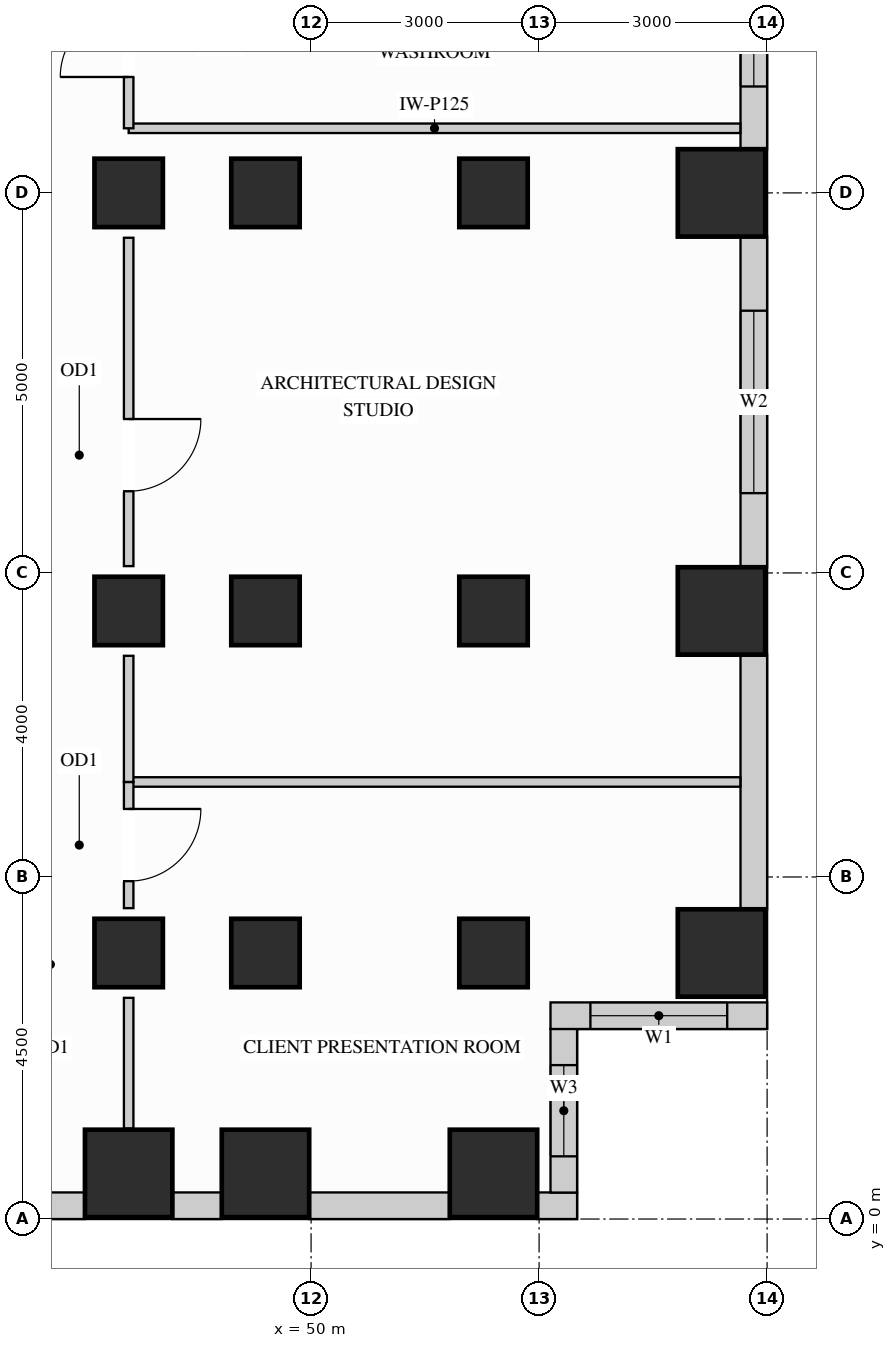
"""IFC4 building model, lengths in metres.
Left out: names, types, materials, properties, quantities, classifications, styles, units other than length and angle.
Written with IfcOpenShell. Run it as: python <this file> out.ifc"""

import sys

from ifc_helpers import new_model, si_unit, direction, frame, frame_2d, origin, origin_2d, place, context, subcontext, project, spatial, rectangle, extrude, source, transform, mapped, element, fill, save


model = new_model("IFC4")
c1 = context("Model", 3, precision=1e-05, world=origin(), true_north=direction((0.0, 1.0)))
c2 = subcontext(c1, "Body", "Model", "MODEL_VIEW")
j1 = project(units=[si_unit("LENGTHUNIT", "METRE"), si_unit("PLANEANGLEUNIT", "RADIAN")], contexts=[c1])
p1 = place(None, origin())
s1 = spatial("IfcSite", under=j1, at=p1, CompositionType="ELEMENT")
p2 = place(p1, origin())
s2 = spatial("IfcBuilding", under=s1, at=p2, CompositionType="ELEMENT")
p3 = place(p2, frame((0.0, 0.0, 109.8)))
s3 = spatial("IfcBuildingStorey", under=s2, at=p3, CompositionType="ELEMENT", Elevation=109.8)
m1 = source(origin(), c2, "Body", "SweptSolid", [
    extrude(rectangle(XDim=0.9, YDim=0.9, at=origin_2d()), origin(), (0.0, 0.0, 1.0), 3.38),
])
for number, where, z_axis, x_axis in (
    (1, (47.6, 13.5, 0.0), (0.0, 0.0, 1.0), (1.0, 0.0, 0.0)),
    (2, (47.6, 3.5, 0.0), (0.0, 0.0, 1.0), (1.0, 0.0, 0.0)),
    (3, (47.6, 8.0, 0.0), (0.0, 0.0, 1.0), (1.0, 0.0, 0.0)),
    (4, (49.4, 13.5, 0.0), (0.0, 0.0, 1.0), (1.0, 0.0, 0.0)),
    (5, (49.4, 3.5, 0.0), (0.0, 0.0, 1.0), (1.0, 0.0, 0.0)),
    (6, (49.4, 8.0, 0.0), (0.0, 0.0, 1.0), (1.0, 0.0, 0.0)),
    (7, (52.4, 13.5, 0.0), (0.0, 0.0, 1.0), (1.0, 0.0, 0.0)),
    (8, (52.4, 3.5, 0.0), (0.0, 0.0, 1.0), (1.0, 0.0, 0.0)),
    (9, (52.4, 8.0, 0.0), (0.0, 0.0, 1.0), (1.0, 0.0, 0.0)),
):
    element("IfcColumn", number, at=place(p3, frame(where, z_axis=z_axis, x_axis=x_axis)), inside=s3, PredefinedType="COLUMN", context=c2, shape_type="MappedRepresentation", body=[
        mapped(m1, transform((0.0, 0.0, 0.0), x_axis=(1.0, 0.0, 0.0), y_axis=(0.0, 1.0, 0.0), z_axis=(0.0, 0.0, 1.0))),
    ])
m2 = source(origin(), c2, "Body", "SweptSolid", [
    extrude(rectangle(XDim=1.15, YDim=1.15, at=origin_2d()), origin(), (0.0, 0.0, 1.0), 3.38),
])
for number, where, z_axis, x_axis in (
    (10, (55.4, 13.5, 0.0), (0.0, 0.0, 1.0), (1.0, 0.0, 0.0)),
    (11, (55.4, 3.5, 0.0), (0.0, 0.0, 1.0), (1.0, 0.0, 0.0)),
    (12, (55.4, 8.0, 0.0), (0.0, 0.0, 1.0), (1.0, 0.0, 0.0)),
    (13, (47.6, 0.6, 0.0), (0.0, 0.0, 1.0), (1.0, 0.0, 0.0)),
    (14, (49.4, 0.6, 0.0), (0.0, 0.0, 1.0), (1.0, 0.0, 0.0)),
    (15, (52.4, 0.6, 0.0), (0.0, 0.0, 1.0), (1.0, 0.0, 0.0)),
):
    element("IfcColumn", number, at=place(p3, frame(where, z_axis=z_axis, x_axis=x_axis)), inside=s3, PredefinedType="COLUMN", context=c2, shape_type="MappedRepresentation", body=[
        mapped(m2, transform((0.0, 0.0, 0.0), x_axis=(1.0, 0.0, 0.0), y_axis=(0.0, 1.0, 0.0), z_axis=(0.0, 0.0, 1.0))),
    ])
p4 = place(p3, frame((40.573, 0.175, 0.0), z_axis=(0.0, 0.0, 1.0), x_axis=(1.0, 0.0, 0.0)))
e16 = element("IfcWall", 16, at=p4, inside=s3, PredefinedType="SOLIDWALL", context=c2, shape_type="SweptSolid", body=[
    extrude(rectangle(XDim=6.454, YDim=0.35, at=frame_2d((3.227, 0.0))), origin(), (0.0, 0.0, 1.0), 3.365),
])
p5 = place(p4, frame((0.712, 0.0, 0.78)))
e17 = element("IfcOpeningElement", 17, at=p5, cuts=e16, PredefinedType="OPENING", context=c2, shape_type="SweptSolid", body=[
    extrude(rectangle(XDim=1.8, YDim=2.1, at=frame_2d((0.9, 1.05))), frame((0.0, 0.185, 0.0), z_axis=(0.0, -1.0, 0.0), x_axis=(1.0, 0.0, 0.0)), (0.0, 0.0, 1.0), 0.37),
])
p6 = place(p4, frame((2.905, 0.0, 0.78)))
e18 = element("IfcOpeningElement", 18, at=p6, cuts=e16, PredefinedType="OPENING", context=c2, shape_type="SweptSolid", body=[
    extrude(rectangle(XDim=1.8, YDim=2.1, at=frame_2d((0.9, 1.05))), frame((0.0, 0.185, 0.0), z_axis=(0.0, -1.0, 0.0), x_axis=(1.0, 0.0, 0.0)), (0.0, 0.0, 1.0), 0.37),
])
m3 = source(origin(), c2, "Body", "SweptSolid", [
    extrude(rectangle(XDim=0.654, YDim=0.35, at=frame_2d((0.327, 0.0))), origin(), (0.0, 0.0, 1.0), 3.365),
])
p7 = place(p3, frame((48.173, 0.175, 0.0), z_axis=(0.0, 0.0, 1.0), x_axis=(1.0, 0.0, 0.0)))
e19 = element("IfcWall", 19, at=p7, inside=s3, PredefinedType="SOLIDWALL", context=c2, shape_type="MappedRepresentation", body=[
    mapped(m3, transform((0.0, 0.0, 0.0), x_axis=(1.0, 0.0, 0.0), y_axis=(0.0, 1.0, 0.0), z_axis=(0.0, 0.0, 1.0))),
])
m4 = source(origin(), c2, "Body", "SweptSolid", [
    extrude(rectangle(XDim=1.854, YDim=0.35, at=frame_2d((0.927, 0.0))), origin(), (0.0, 0.0, 1.0), 3.365),
])
p8 = place(p3, frame((49.973, 0.175, 0.0), z_axis=(0.0, 0.0, 1.0), x_axis=(1.0, 0.0, 0.0)))
e20 = element("IfcWall", 20, at=p8, inside=s3, PredefinedType="SOLIDWALL", context=c2, shape_type="MappedRepresentation", body=[
    mapped(m4, transform((0.0, 0.0, 0.0), x_axis=(1.0, 0.0, 0.0), y_axis=(0.0, 1.0, 0.0), z_axis=(0.0, 0.0, 1.0))),
])
m5 = source(origin(), c2, "Body", "SweptSolid", [
    extrude(rectangle(XDim=0.527, YDim=0.35, at=frame_2d((0.264, 0.0))), origin(), (0.0, 0.0, 1.0), 3.365),
])
p9 = place(p3, frame((52.973, 0.175, 0.0), z_axis=(0.0, 0.0, 1.0), x_axis=(1.0, 0.0, 0.0)))
e21 = element("IfcWall", 21, at=p9, inside=s3, PredefinedType="SOLIDWALL", context=c2, shape_type="MappedRepresentation", body=[
    mapped(m5, transform((0.0, 0.0, 0.0), x_axis=(1.0, 0.0, 0.0), y_axis=(0.0, 1.0, 0.0), z_axis=(0.0, 0.0, 1.0))),
])
p10 = place(p3, frame((53.325, 0.348, 0.0), z_axis=(0.0, 0.0, 1.0), x_axis=(0.0, 1.0, 0.0)))
e22 = element("IfcWall", 22, at=p10, inside=s3, PredefinedType="SOLIDWALL", context=c2, shape_type="SweptSolid", body=[
    extrude(rectangle(XDim=2.154, YDim=0.35, at=frame_2d((1.077, 0.0))), origin(), (0.0, 0.0, 1.0), 3.365),
])
p11 = place(p10, frame((0.477, 0.0, 0.78)))
e23 = element("IfcOpeningElement", 23, at=p11, cuts=e22, PredefinedType="OPENING", context=c2, shape_type="SweptSolid", body=[
    extrude(rectangle(XDim=1.2, YDim=2.1, at=frame_2d((0.6, 1.05))), frame((0.0, 0.185, 0.0), z_axis=(0.0, -1.0, 0.0), x_axis=(1.0, 0.0, 0.0)), (0.0, 0.0, 1.0), 0.37),
])
p12 = place(p3, frame((53.15, 2.675, 0.0), z_axis=(0.0, 0.0, 1.0), x_axis=(1.0, 0.0, 0.0)))
e24 = element("IfcWall", 24, at=p12, inside=s3, PredefinedType="SOLIDWALL", context=c2, shape_type="SweptSolid", body=[
    extrude(rectangle(XDim=2.85, YDim=0.35, at=frame_2d((1.425, 0.0))), origin(), (0.0, 0.0, 1.0), 3.365),
])
p13 = place(p12, frame((0.525, 0.0, 0.78)))
e25 = element("IfcOpeningElement", 25, at=p13, cuts=e24, PredefinedType="OPENING", context=c2, shape_type="SweptSolid", body=[
    extrude(rectangle(XDim=1.8, YDim=2.1, at=frame_2d((0.9, 1.05))), frame((0.0, 0.185, 0.0), z_axis=(0.0, -1.0, 0.0), x_axis=(1.0, 0.0, 0.0)), (0.0, 0.0, 1.0), 0.37),
])
m6 = source(origin(), c2, "Body", "SweptSolid", [
    extrude(rectangle(XDim=3.354, YDim=0.35, at=frame_2d((1.677, 0.0))), origin(), (0.0, 0.0, 1.0), 3.365),
])
p14 = place(p3, frame((55.825, 4.073, 0.0), z_axis=(0.0, 0.0, 1.0), x_axis=(0.0, 1.0, 0.0)))
e26 = element("IfcWall", 26, at=p14, inside=s3, PredefinedType="SOLIDWALL", context=c2, shape_type="MappedRepresentation", body=[
    mapped(m6, transform((0.0, 0.0, 0.0), x_axis=(1.0, 0.0, 0.0), y_axis=(0.0, 1.0, 0.0), z_axis=(0.0, 0.0, 1.0))),
])
p15 = place(p3, frame((55.825, 8.573, 0.0), z_axis=(0.0, 0.0, 1.0), x_axis=(0.0, 1.0, 0.0)))
e27 = element("IfcWall", 27, at=p15, inside=s3, PredefinedType="SOLIDWALL", context=c2, shape_type="SweptSolid", body=[
    extrude(rectangle(XDim=4.354, YDim=0.35, at=frame_2d((2.177, 0.0))), origin(), (0.0, 0.0, 1.0), 3.365),
])
p16 = place(p15, frame((0.977, 0.0, 0.78)))
e28 = element("IfcOpeningElement", 28, at=p16, cuts=e27, PredefinedType="OPENING", context=c2, shape_type="SweptSolid", body=[
    extrude(rectangle(XDim=2.4, YDim=2.1, at=frame_2d((1.2, 1.05))), frame((0.0, 0.185, 0.0), z_axis=(0.0, -1.0, 0.0), x_axis=(1.0, 0.0, 0.0)), (0.0, 0.0, 1.0), 0.37),
])
p17 = place(p3, frame((55.825, 14.073, 0.0), z_axis=(0.0, 0.0, 1.0), x_axis=(0.0, 1.0, 0.0)))
e29 = element("IfcWall", 29, at=p17, inside=s3, PredefinedType="SOLIDWALL", context=c2, shape_type="SweptSolid", body=[
    extrude(rectangle(XDim=2.754, YDim=0.35, at=frame_2d((1.377, 0.0))), origin(), (0.0, 0.0, 1.0), 3.365),
])
p18 = place(p17, frame((0.827, 0.0, 0.78)))
e30 = element("IfcOpeningElement", 30, at=p18, cuts=e29, PredefinedType="OPENING", context=c2, shape_type="SweptSolid", body=[
    extrude(rectangle(XDim=1.2, YDim=2.1, at=frame_2d((0.6, 1.05))), frame((0.0, 0.185, 0.0), z_axis=(0.0, -1.0, 0.0), x_axis=(1.0, 0.0, 0.0)), (0.0, 0.0, 1.0), 0.37),
])
m7 = source(origin(), c2, "Body", "SweptSolid", [
    extrude(rectangle(XDim=8.048, YDim=0.125, at=frame_2d((4.024, 0.0))), origin(), (0.0, 0.0, 1.0), 3.365),
])
for number, where, z_axis, x_axis in (
    (31, (47.6, 14.35, 0.0), (0.0, 0.0, 1.0), (1.0, 0.0, 0.0)),
    (32, (47.6, 5.75, 0.0), (0.0, 0.0, 1.0), (1.0, 0.0, 0.0)),
):
    element("IfcWall", number, at=place(p3, frame(where, z_axis=z_axis, x_axis=x_axis)), inside=s3, PredefinedType="PARTITIONING", context=c2, shape_type="MappedRepresentation", body=[
        mapped(m7, transform((0.0, 0.0, 0.0), x_axis=(1.0, 0.0, 0.0), y_axis=(0.0, 1.0, 0.0), z_axis=(0.0, 0.0, 1.0))),
    ])
p19 = place(p3, frame((47.6, 4.09, 0.0), z_axis=(0.0, 0.0, 1.0), x_axis=(0.0, 1.0, 0.0)))
e33 = element("IfcWall", 33, at=p19, inside=s3, PredefinedType="PARTITIONING", context=c2, shape_type="SweptSolid", body=[
    extrude(rectangle(XDim=1.66, YDim=0.125, at=frame_2d((0.83, 0.0))), origin(), (0.0, 0.0, 1.0), 2.677),
])
p20 = place(p19, frame((0.355, 0.0, 0.0)))
e34 = element("IfcOpeningElement", 34, at=p20, cuts=e33, PredefinedType="OPENING", context=c2, shape_type="SweptSolid", body=[
    extrude(rectangle(XDim=0.95, YDim=2.15, at=frame_2d((0.475, 1.075))), frame((0.0, 0.073, 0.0), z_axis=(0.0, -1.0, 0.0), x_axis=(1.0, 0.0, 0.0)), (0.0, 0.0, 1.0), 0.145),
])
m8 = source(origin(), c2, "Body", "SweptSolid", [
    extrude(rectangle(XDim=1.72, YDim=0.125, at=frame_2d((0.86, 0.0))), origin(), (0.0, 0.0, 1.0), 2.677),
])
p21 = place(p3, frame((47.6, 1.19, 0.0), z_axis=(0.0, 0.0, 1.0), x_axis=(0.0, 1.0, 0.0)))
e35 = element("IfcWall", 35, at=p21, inside=s3, PredefinedType="PARTITIONING", context=c2, shape_type="MappedRepresentation", body=[
    mapped(m8, transform((0.0, 0.0, 0.0), x_axis=(1.0, 0.0, 0.0), y_axis=(0.0, 1.0, 0.0), z_axis=(0.0, 0.0, 1.0))),
])
m9 = source(origin(), c2, "Body", "SweptSolid", [
    extrude(rectangle(XDim=1.66, YDim=0.125, at=frame_2d((0.83, 0.0))), origin(), (0.0, 0.0, 1.0), 2.677),
])
p22 = place(p3, frame((47.6, 5.75, 0.0), z_axis=(0.0, 0.0, 1.0), x_axis=(0.0, 1.0, 0.0)))
e36 = element("IfcWall", 36, at=p22, inside=s3, PredefinedType="PARTITIONING", context=c2, shape_type="MappedRepresentation", body=[
    mapped(m9, transform((0.0, 0.0, 0.0), x_axis=(1.0, 0.0, 0.0), y_axis=(0.0, 1.0, 0.0), z_axis=(0.0, 0.0, 1.0))),
])
p23 = place(p3, frame((47.6, 8.59, 0.0), z_axis=(0.0, 0.0, 1.0), x_axis=(0.0, 1.0, 0.0)))
e37 = element("IfcWall", 37, at=p23, inside=s3, PredefinedType="PARTITIONING", context=c2, shape_type="SweptSolid", body=[
    extrude(rectangle(XDim=4.32, YDim=0.125, at=frame_2d((2.16, 0.0))), origin(), (0.0, 0.0, 1.0), 2.677),
])
p24 = place(p23, frame((0.985, 0.0, 0.0)))
e38 = element("IfcOpeningElement", 38, at=p24, cuts=e37, PredefinedType="OPENING", context=c2, shape_type="SweptSolid", body=[
    extrude(rectangle(XDim=0.95, YDim=2.15, at=frame_2d((0.475, 1.075))), frame((0.0, 0.073, 0.0), z_axis=(0.0, -1.0, 0.0), x_axis=(1.0, 0.0, 0.0)), (0.0, 0.0, 1.0), 0.145),
])
p25 = place(p3, frame((47.6, 14.35, 0.0), z_axis=(0.0, 0.0, 1.0), x_axis=(0.0, 1.0, 0.0)))
e39 = element("IfcWall", 39, at=p25, inside=s3, PredefinedType="PARTITIONING", context=c2, shape_type="SweptSolid", body=[
    extrude(rectangle(XDim=2.3, YDim=0.125, at=frame_2d((1.15, 0.0))), origin(), (0.0, 0.0, 1.0), 2.677),
])
p26 = place(p25, frame((0.675, 0.0, 0.0)))
e40 = element("IfcOpeningElement", 40, at=p26, cuts=e39, PredefinedType="OPENING", context=c2, shape_type="SweptSolid", body=[
    extrude(rectangle(XDim=0.9, YDim=2.15, at=frame_2d((0.45, 1.075))), frame((0.0, 0.073, 0.0), z_axis=(0.0, -1.0, 0.0), x_axis=(1.0, 0.0, 0.0)), (0.0, 0.0, 1.0), 0.145),
])
m10 = source(origin(), c2, "Body", "SweptSolid", [
    extrude(rectangle(XDim=0.95, YDim=2.15, at=frame_2d((0.475, 1.075))), frame((0.0, 0.025, 0.0), z_axis=(0.0, -1.0, 0.0), x_axis=(1.0, 0.0, 0.0)), (0.0, 0.0, 1.0), 0.05),
])
p27 = place(p20, origin())
e41 = element("IfcDoor", 41, at=p27, inside=s3, OperationType="SINGLE_SWING_RIGHT", PredefinedType="DOOR", context=c2, shape_type="MappedRepresentation", body=[
    mapped(m10, transform((0.0, 0.0, 0.0), x_axis=(1.0, 0.0, 0.0), y_axis=(0.0, 1.0, 0.0), z_axis=(0.0, 0.0, 1.0))),
])
fill(e34, e41)
p28 = place(p24, origin())
e42 = element("IfcDoor", 42, at=p28, inside=s3, OperationType="SINGLE_SWING_RIGHT", PredefinedType="DOOR", context=c2, shape_type="MappedRepresentation", body=[
    mapped(m10, transform((0.0, 0.0, 0.0), x_axis=(1.0, 0.0, 0.0), y_axis=(0.0, 1.0, 0.0), z_axis=(0.0, 0.0, 1.0))),
])
fill(e38, e42)
m11 = source(origin(), c2, "Body", "SweptSolid", [
    extrude(rectangle(XDim=0.9, YDim=2.15, at=frame_2d((0.45, 1.075))), frame((0.0, 0.025, 0.0), z_axis=(0.0, -1.0, 0.0), x_axis=(1.0, 0.0, 0.0)), (0.0, 0.0, 1.0), 0.05),
])
p29 = place(p26, origin())
e43 = element("IfcDoor", 43, at=p29, inside=s3, OperationType="SINGLE_SWING_LEFT", PredefinedType="DOOR", context=c2, shape_type="MappedRepresentation", body=[
    mapped(m11, transform((0.0, 0.0, 0.0), x_axis=(1.0, 0.0, 0.0), y_axis=(0.0, 1.0, 0.0), z_axis=(0.0, 0.0, 1.0))),
])
fill(e40, e43)
m12 = source(origin(), c2, "Body", "SweptSolid", [
    extrude(rectangle(XDim=1.8, YDim=2.1, at=frame_2d((0.9, 1.05))), frame((0.0, 0.03, 0.0), z_axis=(0.0, -1.0, 0.0), x_axis=(1.0, 0.0, 0.0)), (0.0, 0.0, 1.0), 0.06),
])
p30 = place(p13, origin())
e44 = element("IfcWindow", 44, at=p30, inside=s3, PartitioningType="SINGLE_PANEL", PredefinedType="WINDOW", context=c2, shape_type="MappedRepresentation", body=[
    mapped(m12, transform((0.0, 0.0, 0.0), x_axis=(1.0, 0.0, 0.0), y_axis=(0.0, 1.0, 0.0), z_axis=(0.0, 0.0, 1.0))),
])
fill(e25, e44)
m13 = source(origin(), c2, "Body", "SweptSolid", [
    extrude(rectangle(XDim=2.4, YDim=2.1, at=frame_2d((1.2, 1.05))), frame((0.0, 0.03, 0.0), z_axis=(0.0, -1.0, 0.0), x_axis=(1.0, 0.0, 0.0)), (0.0, 0.0, 1.0), 0.06),
])
p31 = place(p16, origin())
e45 = element("IfcWindow", 45, at=p31, inside=s3, PartitioningType="SINGLE_PANEL", PredefinedType="WINDOW", context=c2, shape_type="MappedRepresentation", body=[
    mapped(m13, transform((0.0, 0.0, 0.0), x_axis=(1.0, 0.0, 0.0), y_axis=(0.0, 1.0, 0.0), z_axis=(0.0, 0.0, 1.0))),
])
fill(e28, e45)
m14 = source(origin(), c2, "Body", "SweptSolid", [
    extrude(rectangle(XDim=1.2, YDim=2.1, at=frame_2d((0.6, 1.05))), frame((0.0, 0.03, 0.0), z_axis=(0.0, -1.0, 0.0), x_axis=(1.0, 0.0, 0.0)), (0.0, 0.0, 1.0), 0.06),
])
p32 = place(p11, origin())
e46 = element("IfcWindow", 46, at=p32, inside=s3, PartitioningType="SINGLE_PANEL", PredefinedType="WINDOW", context=c2, shape_type="MappedRepresentation", body=[
    mapped(m14, transform((0.0, 0.0, 0.0), x_axis=(1.0, 0.0, 0.0), y_axis=(0.0, 1.0, 0.0), z_axis=(0.0, 0.0, 1.0))),
])
fill(e23, e46)
p33 = place(p18, origin())
e47 = element("IfcWindow", 47, at=p33, inside=s3, PartitioningType="SINGLE_PANEL", PredefinedType="WINDOW", context=c2, shape_type="MappedRepresentation", body=[
    mapped(m14, transform((0.0, 0.0, 0.0), x_axis=(1.0, 0.0, 0.0), y_axis=(0.0, 1.0, 0.0), z_axis=(0.0, 0.0, 1.0))),
])
fill(e30, e47)
save(model, sys.argv[1])
